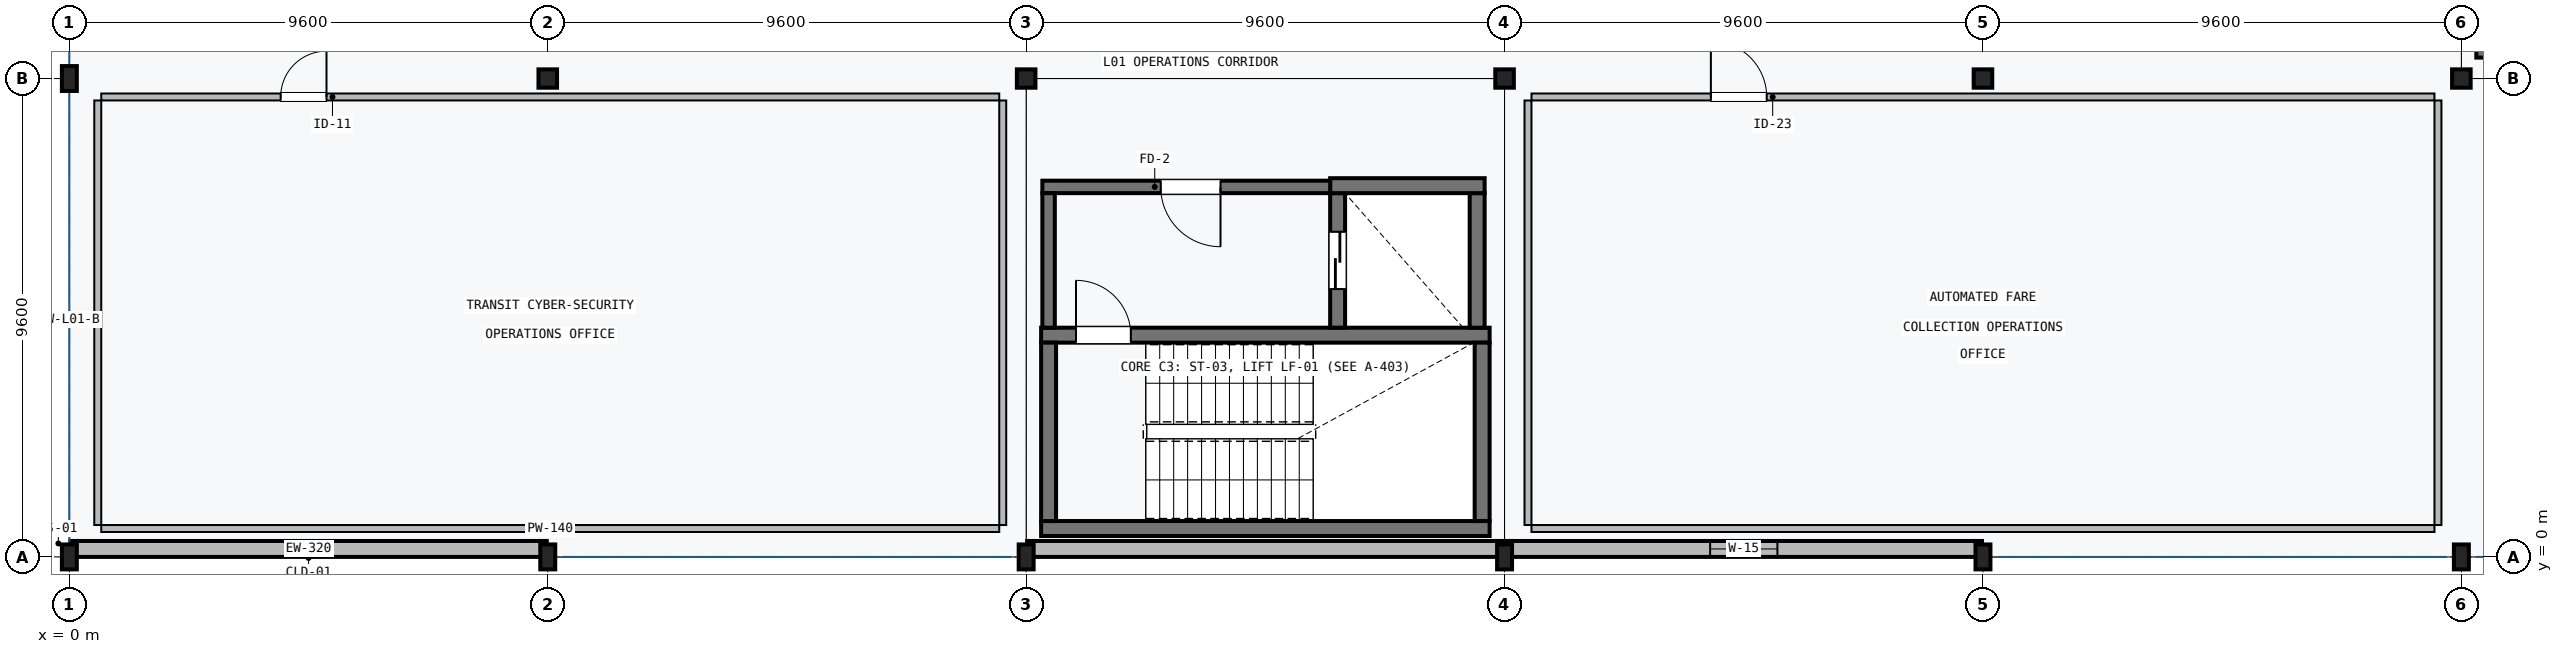
"""IFC4 building model, lengths in metres.
Left out: names, types, materials, properties, quantities, classifications, styles, units other than length and angle.
Written with IfcOpenShell. Run it as: python <this file> out.ifc"""

import sys

from ifc_helpers import new_model, si_unit, direction, frame, frame_2d, origin, origin_2d, place, context, subcontext, project, spatial, rectangle, i_section, extrude, element, fill, save


model = new_model("IFC4")
c1 = context("Model", 3, precision=1e-05, world=origin(), true_north=direction((0.0, 1.0)))
c2 = subcontext(c1, "Body", "Model", "MODEL_VIEW")
j1 = project(units=[si_unit("LENGTHUNIT", "METRE"), si_unit("PLANEANGLEUNIT", "RADIAN")], contexts=[c1])
p1 = place(None, origin())
s1 = spatial("IfcSite", under=j1, at=p1, CompositionType="ELEMENT")
p2 = place(p1, origin())
s2 = spatial("IfcBuilding", under=s1, at=p2, CompositionType="ELEMENT")
p3 = place(p2, frame((0.0, 0.0, 6.0)))
s3 = spatial("IfcBuildingStorey", under=s2, at=p3, CompositionType="ELEMENT", Elevation=6.0)
for number, where, z_axis, x_axis in (
    (1, (0.0, 0.0, 0.0), (0.0, 0.0, 1.0), (1.0, 0.0, 0.0)),
    (2, (0.0, 9.6, 0.0), (0.0, 0.0, 1.0), (1.0, 0.0, 0.0)),
    (3, (9.6, 0.0, 0.0), (0.0, 0.0, 1.0), (1.0, 0.0, 0.0)),
):
    element("IfcColumn", number, at=place(p3, frame(where, z_axis=z_axis, x_axis=x_axis)), inside=s3, PredefinedType="COLUMN", context=c2, shape_type="SweptSolid", body=[
        extrude(i_section(OverallWidth=0.3, OverallDepth=0.5, WebThickness=0.014, FlangeThickness=0.028, FilletRadius=0.027, at=origin_2d()), origin(), (0.0, 0.0, 1.0), 4.25),
    ])
p4 = place(p3, frame((9.6, 9.6, 0.0), z_axis=(0.0, 0.0, 1.0), x_axis=(1.0, 0.0, 0.0)))
e4 = element("IfcColumn", 4, at=p4, inside=s3, PredefinedType="COLUMN", context=c2, shape_type="SweptSolid", body=[
    extrude(i_section(OverallWidth=0.373, OverallDepth=0.368, WebThickness=0.014, FlangeThickness=0.024, FilletRadius=0.015, at=origin_2d()), origin(), (0.0, 0.0, 1.0), 4.25),
])
p5 = place(p3, frame((19.2, 0.0, 0.0), z_axis=(0.0, 0.0, 1.0), x_axis=(1.0, 0.0, 0.0)))
e5 = element("IfcColumn", 5, at=p5, inside=s3, PredefinedType="COLUMN", context=c2, shape_type="SweptSolid", body=[
    extrude(i_section(OverallWidth=0.3, OverallDepth=0.5, WebThickness=0.014, FlangeThickness=0.028, FilletRadius=0.027, at=origin_2d()), origin(), (0.0, 0.0, 1.0), 4.25),
])
p6 = place(p3, frame((19.2, 9.6, 0.0), z_axis=(0.0, 0.0, 1.0), x_axis=(1.0, 0.0, 0.0)))
e6 = element("IfcColumn", 6, at=p6, inside=s3, PredefinedType="COLUMN", context=c2, shape_type="SweptSolid", body=[
    extrude(i_section(OverallWidth=0.373, OverallDepth=0.368, WebThickness=0.014, FlangeThickness=0.024, FilletRadius=0.015, at=origin_2d()), origin(), (0.0, 0.0, 1.0), 4.25),
])
p7 = place(p3, frame((28.8, 0.0, 0.0), z_axis=(0.0, 0.0, 1.0), x_axis=(1.0, 0.0, 0.0)))
e7 = element("IfcColumn", 7, at=p7, inside=s3, PredefinedType="COLUMN", context=c2, shape_type="SweptSolid", body=[
    extrude(i_section(OverallWidth=0.3, OverallDepth=0.5, WebThickness=0.014, FlangeThickness=0.028, FilletRadius=0.027, at=origin_2d()), origin(), (0.0, 0.0, 1.0), 4.25),
])
p8 = place(p3, frame((28.8, 9.6, 0.0), z_axis=(0.0, 0.0, 1.0), x_axis=(1.0, 0.0, 0.0)))
e8 = element("IfcColumn", 8, at=p8, inside=s3, PredefinedType="COLUMN", context=c2, shape_type="SweptSolid", body=[
    extrude(i_section(OverallWidth=0.373, OverallDepth=0.368, WebThickness=0.014, FlangeThickness=0.024, FilletRadius=0.015, at=origin_2d()), origin(), (0.0, 0.0, 1.0), 4.25),
])
p9 = place(p3, frame((38.4, 0.0, 0.0), z_axis=(0.0, 0.0, 1.0), x_axis=(1.0, 0.0, 0.0)))
e9 = element("IfcColumn", 9, at=p9, inside=s3, PredefinedType="COLUMN", context=c2, shape_type="SweptSolid", body=[
    extrude(i_section(OverallWidth=0.3, OverallDepth=0.5, WebThickness=0.014, FlangeThickness=0.028, FilletRadius=0.027, at=origin_2d()), origin(), (0.0, 0.0, 1.0), 4.25),
])
p10 = place(p3, frame((38.4, 9.6, 0.0), z_axis=(0.0, 0.0, 1.0), x_axis=(1.0, 0.0, 0.0)))
e10 = element("IfcColumn", 10, at=p10, inside=s3, PredefinedType="COLUMN", context=c2, shape_type="SweptSolid", body=[
    extrude(i_section(OverallWidth=0.373, OverallDepth=0.368, WebThickness=0.014, FlangeThickness=0.024, FilletRadius=0.015, at=origin_2d()), origin(), (0.0, 0.0, 1.0), 4.25),
])
p11 = place(p3, frame((48.0, 0.0, 0.0), z_axis=(0.0, 0.0, 1.0), x_axis=(1.0, 0.0, 0.0)))
e11 = element("IfcColumn", 11, at=p11, inside=s3, PredefinedType="COLUMN", context=c2, shape_type="SweptSolid", body=[
    extrude(i_section(OverallWidth=0.3, OverallDepth=0.5, WebThickness=0.014, FlangeThickness=0.028, FilletRadius=0.027, at=origin_2d()), origin(), (0.0, 0.0, 1.0), 4.25),
])
p12 = place(p3, frame((48.0, 9.6, 0.0), z_axis=(0.0, 0.0, 1.0), x_axis=(1.0, 0.0, 0.0)))
e12 = element("IfcColumn", 12, at=p12, inside=s3, PredefinedType="COLUMN", context=c2, shape_type="SweptSolid", body=[
    extrude(i_section(OverallWidth=0.373, OverallDepth=0.368, WebThickness=0.014, FlangeThickness=0.024, FilletRadius=0.015, at=origin_2d()), origin(), (0.0, 0.0, 1.0), 4.25),
])
for number, where, z_axis, x_axis in (
    (13, (48.3, 10.17, 0.0), (0.0, 0.0, 1.0), (1.0, 0.0, 0.0)),
    (14, (19.5, 0.57, 0.0), (0.0, 0.0, 1.0), (1.0, 0.0, 0.0)),
):
    element("IfcWall", number, at=place(p3, frame(where, z_axis=z_axis, x_axis=x_axis)), inside=s3, PredefinedType="SHEAR", context=c2, shape_type="SweptSolid", body=[
        extrude(rectangle(XDim=9.0, YDim=0.3, at=frame_2d((4.5, 0.0))), origin(), (0.0, 0.0, 1.0), 4.25),
    ])
p13 = place(p3, frame((28.5, 4.45, 0.0), z_axis=(0.0, 0.0, 1.0), x_axis=(-1.0, 0.0, 0.0)))
e15 = element("IfcWall", 15, at=p13, inside=s3, PredefinedType="SHEAR", context=c2, shape_type="SweptSolid", body=[
    extrude(rectangle(XDim=9.0, YDim=0.3, at=frame_2d((4.5, 0.0))), origin(), (0.0, 0.0, 1.0), 4.25),
])
p14 = place(p13, frame((7.2, 0.0, 0.0)))
e16 = element("IfcOpeningElement", 16, at=p14, cuts=e15, PredefinedType="OPENING", context=c2, shape_type="SweptSolid", body=[
    extrude(rectangle(XDim=1.1, YDim=2.15, at=frame_2d((0.55, 1.075))), frame((0.0, 0.16, 0.0), z_axis=(0.0, -1.0, 0.0), x_axis=(1.0, 0.0, 0.0)), (0.0, 0.0, 1.0), 0.32),
])
for number, where, z_axis, x_axis in (
    (17, (19.65, 0.72, 0.0), (0.0, 0.0, 1.0), (0.0, 1.0, 0.0)),
    (18, (28.35, 4.3, 0.0), (0.0, 0.0, 1.0), (0.0, -1.0, 0.0)),
):
    element("IfcWall", number, at=place(p3, frame(where, z_axis=z_axis, x_axis=x_axis)), inside=s3, PredefinedType="SHEAR", context=c2, shape_type="SweptSolid", body=[
        extrude(rectangle(XDim=3.58, YDim=0.3, at=frame_2d((1.79, 0.0))), origin(), (0.0, 0.0, 1.0), 4.25),
    ])
p15 = place(p3, frame((25.45, 7.3, 0.0), z_axis=(0.0, 0.0, 1.0), x_axis=(0.0, -1.0, 0.0)))
e19 = element("IfcWall", 19, at=p15, inside=s3, PredefinedType="SHEAR", context=c2, shape_type="SweptSolid", body=[
    extrude(rectangle(XDim=2.7, YDim=0.3, at=frame_2d((1.35, 0.0))), origin(), (0.0, 0.0, 1.0), 4.25),
])
p16 = place(p15, frame((0.775, 0.0, 0.0)))
e20 = element("IfcOpeningElement", 20, at=p16, cuts=e19, PredefinedType="OPENING", context=c2, shape_type="SweptSolid", body=[
    extrude(rectangle(XDim=1.15, YDim=2.1, at=frame_2d((0.575, 1.05))), frame((0.0, 0.16, 0.0), z_axis=(0.0, -1.0, 0.0), x_axis=(1.0, 0.0, 0.0)), (0.0, 0.0, 1.0), 0.32),
])
p17 = place(p3, frame((28.25, 4.6, 0.0), z_axis=(0.0, 0.0, 1.0), x_axis=(0.0, 1.0, 0.0)))
e21 = element("IfcWall", 21, at=p17, inside=s3, PredefinedType="SHEAR", context=c2, shape_type="SweptSolid", body=[
    extrude(rectangle(XDim=2.7, YDim=0.3, at=frame_2d((1.35, 0.0))), origin(), (0.0, 0.0, 1.0), 4.25),
])
p18 = place(p3, frame((25.3, 7.45, 0.0), z_axis=(0.0, 0.0, 1.0), x_axis=(1.0, 0.0, 0.0)))
e22 = element("IfcWall", 22, at=p18, inside=s3, PredefinedType="SHEAR", context=c2, shape_type="SweptSolid", body=[
    extrude(rectangle(XDim=3.1, YDim=0.3, at=frame_2d((1.55, 0.0))), origin(), (0.0, 0.0, 1.0), 4.25),
])
p19 = place(p3, frame((25.3, 7.425, 0.0), z_axis=(0.0, 0.0, 1.0), x_axis=(-1.0, 0.0, 0.0)))
e23 = element("IfcWall", 23, at=p19, inside=s3, PredefinedType="SHEAR", context=c2, shape_type="SweptSolid", body=[
    extrude(rectangle(XDim=5.775, YDim=0.25, at=frame_2d((2.888, 0.0))), origin(), (0.0, 0.0, 1.0), 4.25),
])
p20 = place(p19, frame((2.2, 0.0, 0.0)))
e24 = element("IfcOpeningElement", 24, at=p20, cuts=e23, PredefinedType="OPENING", context=c2, shape_type="SweptSolid", body=[
    extrude(rectangle(XDim=1.2, YDim=2.15, at=frame_2d((0.6, 1.075))), frame((0.0, 0.135, 0.0), z_axis=(0.0, -1.0, 0.0), x_axis=(1.0, 0.0, 0.0)), (0.0, 0.0, 1.0), 0.27),
])
p21 = place(p3, frame((19.65, 4.6, 0.0), z_axis=(0.0, 0.0, 1.0), x_axis=(0.0, 1.0, 0.0)))
e25 = element("IfcWall", 25, at=p21, inside=s3, PredefinedType="SHEAR", context=c2, shape_type="SweptSolid", body=[
    extrude(rectangle(XDim=2.7, YDim=0.25, at=frame_2d((1.35, 0.0))), origin(), (0.0, 0.0, 1.0), 4.25),
])
for number, where, z_axis, x_axis in (
    (26, (9.58, 0.16, 0.0), (0.0, 0.0, 1.0), (-1.0, 0.0, 0.0)),
    (27, (28.78, 0.16, 0.0), (0.0, 0.0, 1.0), (-1.0, 0.0, 0.0)),
):
    element("IfcWall", number, at=place(p3, frame(where, z_axis=z_axis, x_axis=x_axis)), inside=s3, PredefinedType="SOLIDWALL", context=c2, shape_type="SweptSolid", body=[
        extrude(rectangle(XDim=9.56, YDim=0.32, at=frame_2d((4.78, 0.0))), origin(), (0.0, 0.0, 1.0), 3.9),
    ])
p22 = place(p3, frame((38.38, 0.16, 0.0), z_axis=(0.0, 0.0, 1.0), x_axis=(-1.0, 0.0, 0.0)))
e28 = element("IfcWall", 28, at=p22, inside=s3, PredefinedType="SOLIDWALL", context=c2, shape_type="SweptSolid", body=[
    extrude(rectangle(XDim=9.56, YDim=0.32, at=frame_2d((4.78, 0.0))), origin(), (0.0, 0.0, 1.0), 3.9),
])
p23 = place(p22, frame((4.105, 0.0, 0.9)))
e29 = element("IfcOpeningElement", 29, at=p23, cuts=e28, PredefinedType="OPENING", context=c2, shape_type="SweptSolid", body=[
    extrude(rectangle(XDim=1.35, YDim=1.5, at=frame_2d((0.675, 0.75))), frame((0.0, 0.17, 0.0), z_axis=(0.0, -1.0, 0.0), x_axis=(1.0, 0.0, 0.0)), (0.0, 0.0, 1.0), 0.34),
])
p24 = place(p3, frame((18.66, 0.57, 0.0), z_axis=(0.0, 0.0, 1.0), x_axis=(-1.0, 0.0, 0.0)))
e30 = element("IfcWall", 30, at=p24, inside=s3, PredefinedType="PARTITIONING", context=c2, shape_type="SweptSolid", body=[
    extrude(rectangle(XDim=18.02, YDim=0.14, at=frame_2d((9.01, 0.0))), origin(), (0.0, 0.0, 1.0), 3.707),
])
p25 = place(p3, frame((0.64, 9.23, 0.0), z_axis=(0.0, 0.0, 1.0), x_axis=(1.0, 0.0, 0.0)))
e31 = element("IfcWall", 31, at=p25, inside=s3, PredefinedType="PARTITIONING", context=c2, shape_type="SweptSolid", body=[
    extrude(rectangle(XDim=18.02, YDim=0.14, at=frame_2d((9.01, 0.0))), origin(), (0.0, 0.0, 1.0), 3.707),
])
p26 = place(p25, frame((3.6, 0.0, 0.0)))
e32 = element("IfcOpeningElement", 32, at=p26, cuts=e31, PredefinedType="OPENING", context=c2, shape_type="SweptSolid", body=[
    extrude(rectangle(XDim=0.92, YDim=2.15, at=frame_2d((0.46, 1.075))), frame((0.0, 0.08, 0.0), z_axis=(0.0, -1.0, 0.0), x_axis=(1.0, 0.0, 0.0)), (0.0, 0.0, 1.0), 0.16),
])
for number, where, z_axis, x_axis in (
    (33, (0.57, 0.64, 0.0), (0.0, 0.0, 1.0), (0.0, 1.0, 0.0)),
    (34, (18.73, 9.16, 0.0), (0.0, 0.0, 1.0), (0.0, -1.0, 0.0)),
):
    element("IfcWall", number, at=place(p3, frame(where, z_axis=z_axis, x_axis=x_axis)), inside=s3, PredefinedType="PARTITIONING", context=c2, shape_type="SweptSolid", body=[
        extrude(rectangle(XDim=8.52, YDim=0.14, at=frame_2d((4.26, 0.0))), origin(), (0.0, 0.0, 1.0), 3.89),
    ])
p27 = place(p3, frame((47.46, 0.57, 0.0), z_axis=(0.0, 0.0, 1.0), x_axis=(-1.0, 0.0, 0.0)))
e35 = element("IfcWall", 35, at=p27, inside=s3, PredefinedType="PARTITIONING", context=c2, shape_type="SweptSolid", body=[
    extrude(rectangle(XDim=18.12, YDim=0.14, at=frame_2d((9.06, 0.0))), origin(), (0.0, 0.0, 1.0), 3.707),
])
p28 = place(p3, frame((29.34, 9.23, 0.0), z_axis=(0.0, 0.0, 1.0), x_axis=(1.0, 0.0, 0.0)))
e36 = element("IfcWall", 36, at=p28, inside=s3, PredefinedType="PARTITIONING", context=c2, shape_type="SweptSolid", body=[
    extrude(rectangle(XDim=18.12, YDim=0.14, at=frame_2d((9.06, 0.0))), origin(), (0.0, 0.0, 1.0), 3.707),
])
p29 = place(p28, frame((3.6, 0.0, 0.0)))
e37 = element("IfcOpeningElement", 37, at=p29, cuts=e36, PredefinedType="OPENING", context=c2, shape_type="SweptSolid", body=[
    extrude(rectangle(XDim=1.12, YDim=2.2, at=frame_2d((0.56, 1.1))), frame((0.0, 0.08, 0.0), z_axis=(0.0, -1.0, 0.0), x_axis=(1.0, 0.0, 0.0)), (0.0, 0.0, 1.0), 0.16),
])
for number, where, z_axis, x_axis in (
    (38, (29.27, 0.64, 0.0), (0.0, 0.0, 1.0), (0.0, 1.0, 0.0)),
    (39, (47.53, 9.16, 0.0), (0.0, 0.0, 1.0), (0.0, -1.0, 0.0)),
):
    element("IfcWall", number, at=place(p3, frame(where, z_axis=z_axis, x_axis=x_axis)), inside=s3, PredefinedType="PARTITIONING", context=c2, shape_type="SweptSolid", body=[
        extrude(rectangle(XDim=8.52, YDim=0.14, at=frame_2d((4.26, 0.0))), origin(), (0.0, 0.0, 1.0), 3.89),
    ])
p30 = place(p14, frame((1.1, 0.0, 0.0), z_axis=(0.0, 0.0, 1.0), x_axis=(-1.0, 0.0, 0.0)))
e40 = element("IfcDoor", 40, at=p30, inside=s3, OperationType="SINGLE_SWING_RIGHT", PredefinedType="DOOR", context=c2, shape_type="SweptSolid", body=[
    extrude(rectangle(XDim=1.1, YDim=2.15, at=frame_2d((0.55, 1.075))), frame((0.0, 0.025, 0.0), z_axis=(0.0, -1.0, 0.0), x_axis=(1.0, 0.0, 0.0)), (0.0, 0.0, 1.0), 0.05),
])
fill(e16, e40)
p31 = place(p16, frame((1.15, 0.0, 0.0), z_axis=(0.0, 0.0, 1.0), x_axis=(-1.0, 0.0, 0.0)))
e41 = element("IfcDoor", 41, at=p31, inside=s3, OperationType="DOUBLE_DOOR_SLIDING", PredefinedType="DOOR", context=c2, shape_type="SweptSolid", body=[
    extrude(rectangle(XDim=1.15, YDim=2.1, at=frame_2d((0.575, 1.05))), frame((0.0, 0.025, 0.0), z_axis=(0.0, -1.0, 0.0), x_axis=(1.0, 0.0, 0.0)), (0.0, 0.0, 1.0), 0.05),
])
fill(e20, e41)
p32 = place(p20, origin())
e42 = element("IfcDoor", 42, at=p32, inside=s3, OperationType="SINGLE_SWING_LEFT", PredefinedType="DOOR", context=c2, shape_type="SweptSolid", body=[
    extrude(rectangle(XDim=1.2, YDim=2.15, at=frame_2d((0.6, 1.075))), frame((0.0, 0.025, 0.0), z_axis=(0.0, -1.0, 0.0), x_axis=(1.0, 0.0, 0.0)), (0.0, 0.0, 1.0), 0.05),
])
fill(e24, e42)
p33 = place(p23, origin())
e43 = element("IfcWindow", 43, at=p33, inside=s3, PartitioningType="SINGLE_PANEL", PredefinedType="WINDOW", context=c2, shape_type="SweptSolid", body=[
    extrude(rectangle(XDim=1.35, YDim=1.5, at=frame_2d((0.675, 0.75))), frame((0.0, 0.03, 0.0), z_axis=(0.0, -1.0, 0.0), x_axis=(1.0, 0.0, 0.0)), (0.0, 0.0, 1.0), 0.06),
])
fill(e29, e43)
p34 = place(p26, origin())
e44 = element("IfcDoor", 44, at=p34, inside=s3, OperationType="SINGLE_SWING_RIGHT", PredefinedType="DOOR", context=c2, shape_type="SweptSolid", body=[
    extrude(rectangle(XDim=0.92, YDim=2.15, at=frame_2d((0.46, 1.075))), frame((0.0, 0.025, 0.0), z_axis=(0.0, -1.0, 0.0), x_axis=(1.0, 0.0, 0.0)), (0.0, 0.0, 1.0), 0.05),
])
fill(e32, e44)
p35 = place(p29, origin())
e45 = element("IfcDoor", 45, at=p35, inside=s3, OperationType="SINGLE_SWING_LEFT", PredefinedType="DOOR", context=c2, shape_type="SweptSolid", body=[
    extrude(rectangle(XDim=1.12, YDim=2.2, at=frame_2d((0.56, 1.1))), frame((0.0, 0.025, 0.0), z_axis=(0.0, -1.0, 0.0), x_axis=(1.0, 0.0, 0.0)), (0.0, 0.0, 1.0), 0.05),
])
fill(e37, e45)
save(model, sys.argv[1])
